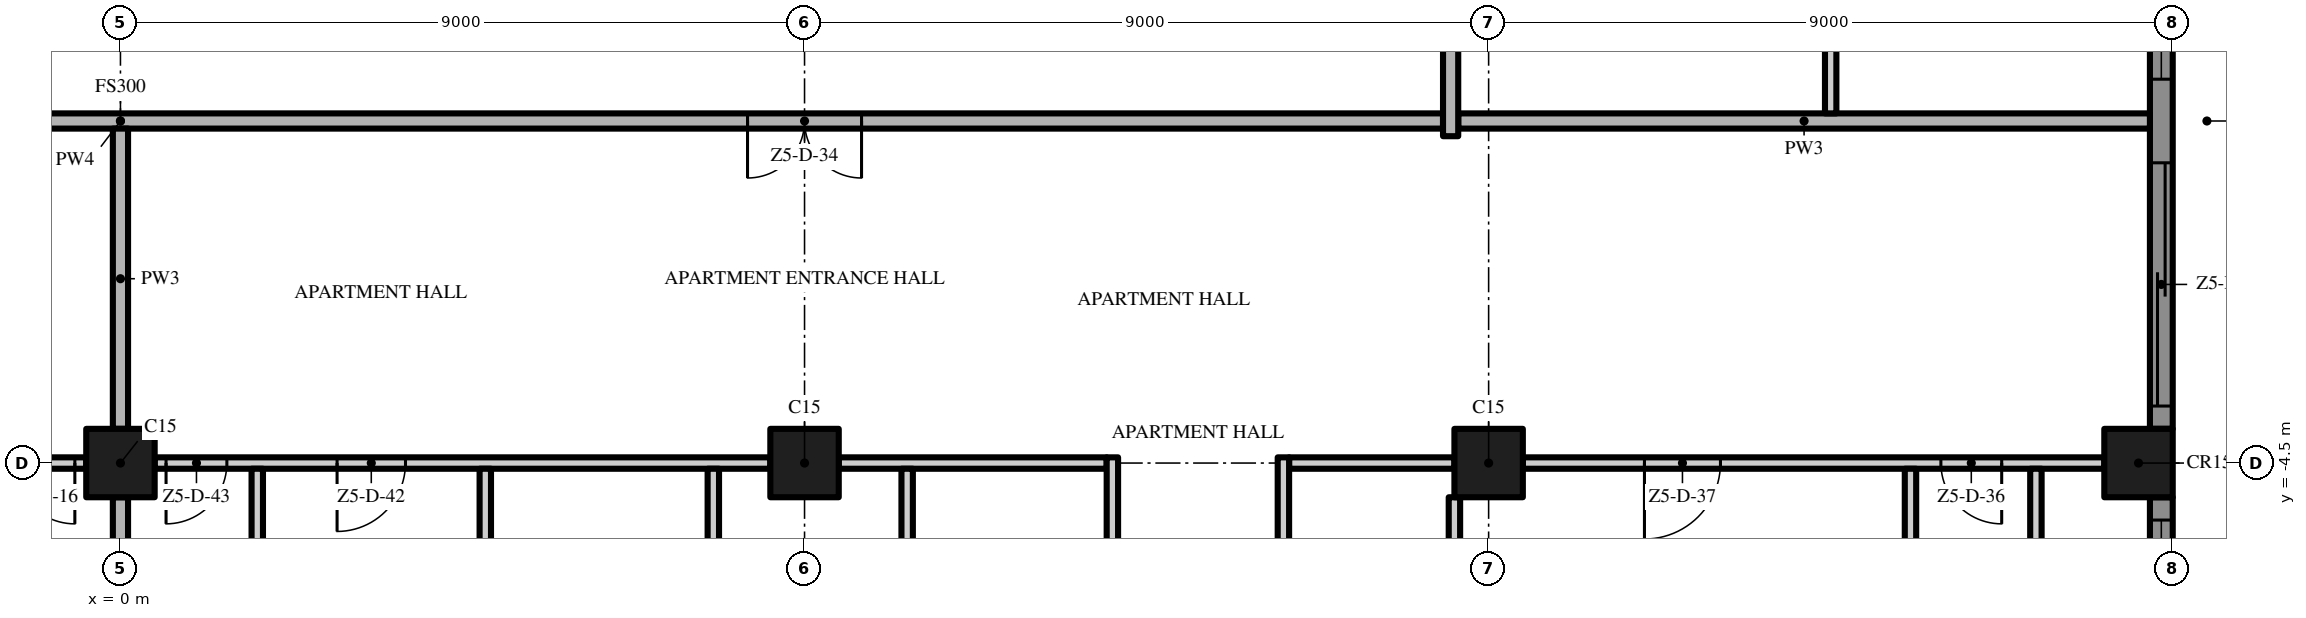
"""IFC4 building model, lengths in metres.
Left out: names, types, materials, properties, quantities, classifications, styles, units other than length and angle.
Written with IfcOpenShell. Run it as: python <this file> out.ifc"""

import sys

from ifc_helpers import new_model, si_unit, direction, frame, frame_2d, origin, origin_2d, place, context, subcontext, project, spatial, polyline, rectangle, outline, extrude, element, fill, save


model = new_model("IFC4")
c1 = context("Model", 3, precision=1e-05, world=origin(), true_north=direction((0.0, 1.0)))
c2 = subcontext(c1, "Body", "Model", "MODEL_VIEW")
j1 = project(units=[si_unit("LENGTHUNIT", "METRE"), si_unit("PLANEANGLEUNIT", "RADIAN")], contexts=[c1])
p1 = place(None, origin())
s1 = spatial("IfcSite", under=j1, at=p1, CompositionType="ELEMENT")
p2 = place(p1, origin())
s2 = spatial("IfcBuilding", under=s1, at=p2, CompositionType="ELEMENT")
p3 = place(p2, frame((0.0, 0.0, 280.6)))
s3 = spatial("IfcBuildingStorey", under=s2, at=p3, CompositionType="ELEMENT", Elevation=280.6)
for number, where, z_axis, x_axis in (
    (1, (0.0, -4.5, 0.0), (0.0, 0.0, 1.0), (1.0, 0.0, 0.0)),
    (2, (18.0, -4.5, 0.0), (0.0, 0.0, 1.0), (1.0, 0.0, 0.0)),
    (3, (26.55, -4.5, 0.0), (0.0, 0.0, 1.0), (1.0, 0.0, 0.0)),
    (4, (9.0, -4.5, 0.0), (0.0, 0.0, 1.0), (1.0, 0.0, 0.0)),
):
    element("IfcColumn", number, at=place(p3, frame(where, z_axis=z_axis, x_axis=x_axis)), inside=s3, PredefinedType="COLUMN", context=c2, shape_type="SweptSolid", body=[
        extrude(rectangle(XDim=0.9, YDim=0.9, at=origin_2d()), origin(), (0.0, 0.0, 1.0), 3.5),
    ])
p4 = place(p3, frame((26.85, -4.95, 0.0), z_axis=(0.0, 0.0, 1.0), x_axis=(0.0, -1.0, 0.0)))
e5 = element("IfcWall", 5, at=p4, inside=s3, PredefinedType="SOLIDWALL", context=c2, shape_type="SweptSolid", body=[
    extrude(rectangle(XDim=8.1, YDim=0.3, at=frame_2d((4.05, 0.0))), origin(), (0.0, 0.0, 1.0), 3.5),
])
p5 = place(p4, frame((4.6, 0.0, 0.45)))
e6 = element("IfcOpeningElement", 6, at=p5, cuts=e5, PredefinedType="OPENING", context=c2, shape_type="SweptSolid", body=[
    extrude(rectangle(XDim=3.2, YDim=2.65, at=frame_2d((1.6, 1.325))), frame((0.0, 0.16, 0.0), z_axis=(0.0, -1.0, 0.0), x_axis=(1.0, 0.0, 0.0)), (0.0, 0.0, 1.0), 0.32),
])
p6 = place(p4, frame((0.3, 0.0, 0.45)))
e7 = element("IfcOpeningElement", 7, at=p6, cuts=e5, PredefinedType="OPENING", context=c2, shape_type="SweptSolid", body=[
    extrude(rectangle(XDim=3.2, YDim=2.65, at=frame_2d((1.6, 1.325))), frame((0.0, 0.16, 0.0), z_axis=(0.0, -1.0, 0.0), x_axis=(1.0, 0.0, 0.0)), (0.0, 0.0, 1.0), 0.32),
])
p7 = place(p3, frame((26.85, 4.05, 0.0), z_axis=(0.0, 0.0, 1.0), x_axis=(0.0, -1.0, 0.0)))
e8 = element("IfcWall", 8, at=p7, inside=s3, PredefinedType="SOLIDWALL", context=c2, shape_type="SweptSolid", body=[
    extrude(rectangle(XDim=8.1, YDim=0.3, at=frame_2d((4.05, 0.0))), origin(), (0.0, 0.0, 1.0), 3.5),
])
p8 = place(p7, frame((4.6, 0.0, 0.0)))
e9 = element("IfcOpeningElement", 9, at=p8, cuts=e8, PredefinedType="OPENING", context=c2, shape_type="SweptSolid", body=[
    extrude(rectangle(XDim=3.2, YDim=2.4, at=frame_2d((1.6, 1.2))), frame((0.0, 0.16, 0.0), z_axis=(0.0, -1.0, 0.0), x_axis=(1.0, 0.0, 0.0)), (0.0, 0.0, 1.0), 0.32),
])
p9 = place(p7, frame((0.3, 0.0, 0.45)))
e10 = element("IfcOpeningElement", 10, at=p9, cuts=e8, PredefinedType="OPENING", context=c2, shape_type="SweptSolid", body=[
    extrude(rectangle(XDim=3.2, YDim=2.65, at=frame_2d((1.6, 1.325))), frame((0.0, 0.16, 0.0), z_axis=(0.0, -1.0, 0.0), x_axis=(1.0, 0.0, 0.0)), (0.0, 0.0, 1.0), 0.32),
])
p10 = place(p3, origin())
e11 = element("IfcWall", 11, at=p10, inside=s3, PredefinedType="USERDEFINED", context=c2, shape_type="SweptSolid", body=[
    extrude(outline(polyline([(30.0, -18.0), (29.771, -16.5), (29.171, -15.0), (28.429, -13.5), (27.829, -12.0), (27.6, -10.5), (27.829, -9.0), (28.429, -7.5), (29.171, -6.0), (29.771, -4.5), (30.0, -3.0), (29.771, -1.5), (29.171, 0.0), (28.429, 1.5), (27.829, 3.0), (27.6, 4.5), (27.829, 6.0), (28.429, 7.5), (29.171, 9.0), (29.771, 10.5), (30.0, 12.0), (29.771, 13.5), (29.171, 15.0), (28.429, 16.5), (27.829, 18.0), (27.597, 17.907), (28.201, 16.398), (28.942, 14.898), (29.528, 13.434), (29.747, 12.0), (29.528, 10.566), (28.942, 9.102), (28.201, 7.602), (27.586, 6.066), (27.347, 4.5), (27.586, 2.934), (28.201, 1.398), (28.942, -0.102), (29.528, -1.566), (29.747, -3.0), (29.528, -4.434), (28.942, -5.898), (28.201, -7.398), (27.586, -8.934), (27.347, -10.5), (27.586, -12.066), (28.201, -13.602), (28.942, -15.102), (29.528, -16.566), (29.753, -18.038), (30.0, -18.0)])), origin(), (0.0, 0.0, 1.0), 0.9),
])
p11 = place(p3, frame((-0.45, -4.5, 0.0), z_axis=(0.0, 0.0, 1.0), x_axis=(-1.0, 0.0, 0.0)))
e12 = element("IfcWall", 12, at=p11, inside=s3, PredefinedType="PARTITIONING", context=c2, shape_type="SweptSolid", body=[
    extrude(rectangle(XDim=8.1, YDim=0.15, at=frame_2d((4.05, 0.0))), origin(), (0.0, 0.0, 1.0), 3.5),
])
p12 = place(p11, frame((0.15, 0.0, 0.0)))
e13 = element("IfcOpeningElement", 13, at=p12, cuts=e12, PredefinedType="OPENING", context=c2, shape_type="SweptSolid", body=[
    extrude(rectangle(XDim=0.8, YDim=2.0, at=frame_2d((0.4, 1.0))), frame((0.0, 0.085, 0.0), z_axis=(0.0, -1.0, 0.0), x_axis=(1.0, 0.0, 0.0)), (0.0, 0.0, 1.0), 0.17),
])
p13 = place(p11, frame((1.85, 0.0, 0.0)))
e14 = element("IfcOpeningElement", 14, at=p13, cuts=e12, PredefinedType="OPENING", context=c2, shape_type="SweptSolid", body=[
    extrude(rectangle(XDim=0.8, YDim=2.0, at=frame_2d((0.4, 1.0))), frame((0.0, 0.085, 0.0), z_axis=(0.0, -1.0, 0.0), x_axis=(1.0, 0.0, 0.0)), (0.0, 0.0, 1.0), 0.17),
])
p14 = place(p11, frame((3.6, 0.0, 0.0)))
e15 = element("IfcOpeningElement", 15, at=p14, cuts=e12, PredefinedType="OPENING", context=c2, shape_type="SweptSolid", body=[
    extrude(rectangle(XDim=0.8, YDim=2.0, at=frame_2d((0.4, 1.0))), frame((0.0, 0.085, 0.0), z_axis=(0.0, -1.0, 0.0), x_axis=(1.0, 0.0, 0.0)), (0.0, 0.0, 1.0), 0.17),
])
p15 = place(p3, frame((8.55, -4.5, 0.0), z_axis=(0.0, 0.0, 1.0), x_axis=(-1.0, 0.0, 0.0)))
e16 = element("IfcWall", 16, at=p15, inside=s3, PredefinedType="PARTITIONING", context=c2, shape_type="SweptSolid", body=[
    extrude(rectangle(XDim=8.1, YDim=0.15, at=frame_2d((4.05, 0.0))), origin(), (0.0, 0.0, 1.0), 3.5),
])
p16 = place(p15, frame((4.8, 0.0, 0.0)))
e17 = element("IfcOpeningElement", 17, at=p16, cuts=e16, PredefinedType="OPENING", context=c2, shape_type="SweptSolid", body=[
    extrude(rectangle(XDim=0.9, YDim=2.1, at=frame_2d((0.45, 1.05))), frame((0.0, 0.085, 0.0), z_axis=(0.0, -1.0, 0.0), x_axis=(1.0, 0.0, 0.0)), (0.0, 0.0, 1.0), 0.17),
])
p17 = place(p15, frame((7.15, 0.0, 0.0)))
e18 = element("IfcOpeningElement", 18, at=p17, cuts=e16, PredefinedType="OPENING", context=c2, shape_type="SweptSolid", body=[
    extrude(rectangle(XDim=0.8, YDim=2.0, at=frame_2d((0.4, 1.0))), frame((0.0, 0.085, 0.0), z_axis=(0.0, -1.0, 0.0), x_axis=(1.0, 0.0, 0.0)), (0.0, 0.0, 1.0), 0.17),
])
p18 = place(p3, frame((9.45, -4.5, 0.0), z_axis=(0.0, 0.0, 1.0), x_axis=(1.0, 0.0, 0.0)))
e19 = element("IfcWall", 19, at=p18, inside=s3, PredefinedType="PARTITIONING", context=c2, shape_type="SweptSolid", body=[
    extrude(rectangle(XDim=3.525, YDim=0.15, at=frame_2d((1.762, 0.0))), origin(), (0.0, 0.0, 1.0), 3.5),
])
p19 = place(p3, frame((15.375, -4.5, 0.0), z_axis=(0.0, 0.0, 1.0), x_axis=(1.0, 0.0, 0.0)))
e20 = element("IfcWall", 20, at=p19, inside=s3, PredefinedType="PARTITIONING", context=c2, shape_type="SweptSolid", body=[
    extrude(rectangle(XDim=2.175, YDim=0.15, at=frame_2d((1.087, 0.0))), origin(), (0.0, 0.0, 1.0), 3.5),
])
p20 = place(p3, frame((26.1, -4.5, 0.0), z_axis=(0.0, 0.0, 1.0), x_axis=(-1.0, 0.0, 0.0)))
e21 = element("IfcWall", 21, at=p20, inside=s3, PredefinedType="PARTITIONING", context=c2, shape_type="SweptSolid", body=[
    extrude(rectangle(XDim=7.65, YDim=0.15, at=frame_2d((3.825, 0.0))), origin(), (0.0, 0.0, 1.0), 3.5),
])
p21 = place(p20, frame((1.35, 0.0, 0.0)))
e22 = element("IfcOpeningElement", 22, at=p21, cuts=e21, PredefinedType="OPENING", context=c2, shape_type="SweptSolid", body=[
    extrude(rectangle(XDim=0.8, YDim=2.0, at=frame_2d((0.4, 1.0))), frame((0.0, 0.085, 0.0), z_axis=(0.0, -1.0, 0.0), x_axis=(1.0, 0.0, 0.0)), (0.0, 0.0, 1.0), 0.17),
])
p22 = place(p20, frame((5.05, 0.0, 0.0)))
e23 = element("IfcOpeningElement", 23, at=p22, cuts=e21, PredefinedType="OPENING", context=c2, shape_type="SweptSolid", body=[
    extrude(rectangle(XDim=1.0, YDim=2.4, at=frame_2d((0.5, 1.2))), frame((0.0, 0.085, 0.0), z_axis=(0.0, -1.0, 0.0), x_axis=(1.0, 0.0, 0.0)), (0.0, 0.0, 1.0), 0.17),
])
p23 = place(p3, frame((17.4, 0.0, 0.0), z_axis=(0.0, 0.0, 1.0), x_axis=(-1.0, 0.0, 0.0)))
e24 = element("IfcWall", 24, at=p23, inside=s3, PredefinedType="PARTITIONING", context=c2, shape_type="SweptSolid", body=[
    extrude(rectangle(XDim=34.8, YDim=0.2, at=frame_2d((17.4, 0.0))), origin(), (0.0, 0.0, 1.0), 3.5),
])
p24 = place(p23, frame((25.65, 0.0, 0.0)))
e25 = element("IfcOpeningElement", 25, at=p24, cuts=e24, PredefinedType="OPENING", context=c2, shape_type="SweptSolid", body=[
    extrude(rectangle(XDim=1.5, YDim=2.4, at=frame_2d((0.75, 1.2))), frame((0.0, 0.11, 0.0), z_axis=(0.0, -1.0, 0.0), x_axis=(1.0, 0.0, 0.0)), (0.0, 0.0, 1.0), 0.22),
])
p25 = place(p23, frame((7.65, 0.0, 0.0)))
e26 = element("IfcOpeningElement", 26, at=p25, cuts=e24, PredefinedType="OPENING", context=c2, shape_type="SweptSolid", body=[
    extrude(rectangle(XDim=1.5, YDim=2.4, at=frame_2d((0.75, 1.2))), frame((0.0, 0.11, 0.0), z_axis=(0.0, -1.0, 0.0), x_axis=(1.0, 0.0, 0.0)), (0.0, 0.0, 1.0), 0.22),
])
p26 = place(p3, frame((17.6, 0.0, 0.0), z_axis=(0.0, 0.0, 1.0), x_axis=(1.0, 0.0, 0.0)))
e27 = element("IfcWall", 27, at=p26, inside=s3, PredefinedType="PARTITIONING", context=c2, shape_type="SweptSolid", body=[
    extrude(rectangle(XDim=9.1, YDim=0.2, at=frame_2d((4.55, 0.0))), origin(), (0.0, 0.0, 1.0), 3.5),
])
p27 = place(p3, frame((0.0, -13.05, 0.0), z_axis=(0.0, 0.0, 1.0), x_axis=(0.0, 1.0, 0.0)))
e28 = element("IfcWall", 28, at=p27, inside=s3, PredefinedType="PARTITIONING", context=c2, shape_type="SweptSolid", body=[
    extrude(rectangle(XDim=8.1, YDim=0.2, at=frame_2d((4.05, 0.0))), origin(), (0.0, 0.0, 1.0), 3.5),
])
p28 = place(p3, frame((0.0, -4.05, 0.0), z_axis=(0.0, 0.0, 1.0), x_axis=(0.0, 1.0, 0.0)))
e29 = element("IfcWall", 29, at=p28, inside=s3, PredefinedType="PARTITIONING", context=c2, shape_type="SweptSolid", body=[
    extrude(rectangle(XDim=3.95, YDim=0.2, at=frame_2d((1.975, 0.0))), origin(), (0.0, 0.0, 1.0), 3.5),
])
for number, where, z_axis, x_axis in (
    (30, (1.8, -8.925, 0.0), (0.0, 0.0, 1.0), (0.0, 1.0, 0.0)),
    (31, (4.8, -8.925, 0.0), (0.0, 0.0, 1.0), (0.0, 1.0, 0.0)),
    (32, (7.8, -8.925, 0.0), (0.0, 0.0, 1.0), (0.0, 1.0, 0.0)),
    (33, (10.35, -8.925, 0.0), (0.0, 0.0, 1.0), (0.0, 1.0, 0.0)),
):
    element("IfcWall", number, at=place(p3, frame(where, z_axis=z_axis, x_axis=x_axis)), inside=s3, PredefinedType="PARTITIONING", context=c2, shape_type="SweptSolid", body=[
        extrude(rectangle(XDim=4.35, YDim=0.15, at=frame_2d((2.175, 0.0))), origin(), (0.0, 0.0, 1.0), 3.5),
    ])
p29 = place(p3, frame((13.05, -8.925, 0.0), z_axis=(0.0, 0.0, 1.0), x_axis=(0.0, 1.0, 0.0)))
e34 = element("IfcWall", 34, at=p29, inside=s3, PredefinedType="PARTITIONING", context=c2, shape_type="SweptSolid", body=[
    extrude(rectangle(XDim=4.5, YDim=0.15, at=frame_2d((2.25, 0.0))), origin(), (0.0, 0.0, 1.0), 3.5),
])
p30 = place(p3, frame((15.3, -4.425, 0.0), z_axis=(0.0, 0.0, 1.0), x_axis=(0.0, -1.0, 0.0)))
e35 = element("IfcWall", 35, at=p30, inside=s3, PredefinedType="PARTITIONING", context=c2, shape_type="SweptSolid", body=[
    extrude(rectangle(XDim=4.65, YDim=0.15, at=frame_2d((2.325, 0.0))), origin(), (0.0, 0.0, 1.0), 3.5),
])
p31 = place(p30, frame((1.875, 0.0, 0.0)))
e36 = element("IfcOpeningElement", 36, at=p31, cuts=e35, PredefinedType="OPENING", context=c2, shape_type="SweptSolid", body=[
    extrude(rectangle(XDim=0.9, YDim=2.1, at=frame_2d((0.45, 1.05))), frame((0.0, 0.085, 0.0), z_axis=(0.0, -1.0, 0.0), x_axis=(1.0, 0.0, 0.0)), (0.0, 0.0, 1.0), 0.17),
])
p32 = place(p3, frame((17.5, -0.2, 0.0), z_axis=(0.0, 0.0, 1.0), x_axis=(0.0, 1.0, 0.0)))
e37 = element("IfcWall", 37, at=p32, inside=s3, PredefinedType="PARTITIONING", context=c2, shape_type="SweptSolid", body=[
    extrude(rectangle(XDim=4.25, YDim=0.2, at=frame_2d((2.125, 0.0))), origin(), (0.0, 0.0, 1.0), 3.5),
])
p33 = place(p3, frame((17.55, -8.925, 0.0), z_axis=(0.0, 0.0, 1.0), x_axis=(0.0, 1.0, 0.0)))
e38 = element("IfcWall", 38, at=p33, inside=s3, PredefinedType="PARTITIONING", context=c2, shape_type="SweptSolid", body=[
    extrude(rectangle(XDim=3.975, YDim=0.15, at=frame_2d((1.988, 0.0))), origin(), (0.0, 0.0, 1.0), 3.5),
])
p34 = place(p3, frame((22.5, 17.55, 0.0), z_axis=(0.0, 0.0, 1.0), x_axis=(0.0, -1.0, 0.0)))
e39 = element("IfcWall", 39, at=p34, inside=s3, PredefinedType="PARTITIONING", context=c2, shape_type="SweptSolid", body=[
    extrude(rectangle(XDim=17.45, YDim=0.15, at=frame_2d((8.725, 0.0))), origin(), (0.0, 0.0, 1.0), 3.5),
])
p35 = place(p34, frame((14.8, 0.0, 0.0)))
e40 = element("IfcOpeningElement", 40, at=p35, cuts=e39, PredefinedType="OPENING", context=c2, shape_type="SweptSolid", body=[
    extrude(rectangle(XDim=1.0, YDim=2.4, at=frame_2d((0.5, 1.2))), frame((0.0, 0.085, 0.0), z_axis=(0.0, -1.0, 0.0), x_axis=(1.0, 0.0, 0.0)), (0.0, 0.0, 1.0), 0.17),
])
p36 = place(p34, frame((7.65, 0.0, 0.0)))
e41 = element("IfcOpeningElement", 41, at=p36, cuts=e39, PredefinedType="OPENING", context=c2, shape_type="SweptSolid", body=[
    extrude(rectangle(XDim=1.8, YDim=2.4, at=frame_2d((0.9, 1.2))), frame((0.0, 0.085, 0.0), z_axis=(0.0, -1.0, 0.0), x_axis=(1.0, 0.0, 0.0)), (0.0, 0.0, 1.0), 0.17),
])
for number, where, z_axis, x_axis in (
    (42, (23.55, -8.925, 0.0), (0.0, 0.0, 1.0), (0.0, 1.0, 0.0)),
    (43, (25.2, -8.925, 0.0), (0.0, 0.0, 1.0), (0.0, 1.0, 0.0)),
):
    element("IfcWall", number, at=place(p3, frame(where, z_axis=z_axis, x_axis=x_axis)), inside=s3, PredefinedType="PARTITIONING", context=c2, shape_type="SweptSolid", body=[
        extrude(rectangle(XDim=4.35, YDim=0.15, at=frame_2d((2.175, 0.0))), origin(), (0.0, 0.0, 1.0), 3.5),
    ])
p37 = place(p6, origin())
e44 = element("IfcWindow", 44, at=p37, inside=s3, PartitioningType="SINGLE_PANEL", PredefinedType="WINDOW", context=c2, shape_type="SweptSolid", body=[
    extrude(rectangle(XDim=3.2, YDim=2.65, at=frame_2d((1.6, 1.325))), frame((0.0, 0.03, 0.0), z_axis=(0.0, -1.0, 0.0), x_axis=(1.0, 0.0, 0.0)), (0.0, 0.0, 1.0), 0.06),
])
fill(e7, e44)
p38 = place(p8, origin())
e45 = element("IfcDoor", 45, at=p38, inside=s3, OperationType="SINGLE_SWING_LEFT", PredefinedType="DOOR", context=c2, shape_type="SweptSolid", body=[
    extrude(rectangle(XDim=3.2, YDim=2.4, at=frame_2d((1.6, 1.2))), frame((0.0, 0.025, 0.0), z_axis=(0.0, -1.0, 0.0), x_axis=(1.0, 0.0, 0.0)), (0.0, 0.0, 1.0), 0.05),
])
fill(e9, e45)
p39 = place(p9, origin())
e46 = element("IfcWindow", 46, at=p39, inside=s3, PartitioningType="SINGLE_PANEL", PredefinedType="WINDOW", context=c2, shape_type="SweptSolid", body=[
    extrude(rectangle(XDim=3.2, YDim=2.65, at=frame_2d((1.6, 1.325))), frame((0.0, 0.03, 0.0), z_axis=(0.0, -1.0, 0.0), x_axis=(1.0, 0.0, 0.0)), (0.0, 0.0, 1.0), 0.06),
])
fill(e10, e46)
p40 = place(p12, origin())
e47 = element("IfcDoor", 47, at=p40, inside=s3, OperationType="SINGLE_SWING_LEFT", PredefinedType="DOOR", context=c2, shape_type="SweptSolid", body=[
    extrude(rectangle(XDim=0.8, YDim=2.0, at=frame_2d((0.4, 1.0))), frame((0.0, 0.025, 0.0), z_axis=(0.0, -1.0, 0.0), x_axis=(1.0, 0.0, 0.0)), (0.0, 0.0, 1.0), 0.05),
])
fill(e13, e47)
p41 = place(p25, origin())
e48 = element("IfcDoor", 48, at=p41, inside=s3, OperationType="DOUBLE_DOOR_SINGLE_SWING", PredefinedType="DOOR", context=c2, shape_type="SweptSolid", body=[
    extrude(rectangle(XDim=1.5, YDim=2.4, at=frame_2d((0.75, 1.2))), frame((0.0, 0.025, 0.0), z_axis=(0.0, -1.0, 0.0), x_axis=(1.0, 0.0, 0.0)), (0.0, 0.0, 1.0), 0.05),
])
fill(e26, e48)
p42 = place(p21, origin())
e49 = element("IfcDoor", 49, at=p42, inside=s3, OperationType="SINGLE_SWING_LEFT", PredefinedType="DOOR", context=c2, shape_type="SweptSolid", body=[
    extrude(rectangle(XDim=0.8, YDim=2.0, at=frame_2d((0.4, 1.0))), frame((0.0, 0.025, 0.0), z_axis=(0.0, -1.0, 0.0), x_axis=(1.0, 0.0, 0.0)), (0.0, 0.0, 1.0), 0.05),
])
fill(e22, e49)
p43 = place(p22, origin())
e50 = element("IfcDoor", 50, at=p43, inside=s3, OperationType="SINGLE_SWING_RIGHT", PredefinedType="DOOR", context=c2, shape_type="SweptSolid", body=[
    extrude(rectangle(XDim=1.0, YDim=2.4, at=frame_2d((0.5, 1.2))), frame((0.0, 0.025, 0.0), z_axis=(0.0, -1.0, 0.0), x_axis=(1.0, 0.0, 0.0)), (0.0, 0.0, 1.0), 0.05),
])
fill(e23, e50)
p44 = place(p16, origin())
e51 = element("IfcDoor", 51, at=p44, inside=s3, OperationType="SINGLE_SWING_RIGHT", PredefinedType="DOOR", context=c2, shape_type="SweptSolid", body=[
    extrude(rectangle(XDim=0.9, YDim=2.1, at=frame_2d((0.45, 1.05))), frame((0.0, 0.025, 0.0), z_axis=(0.0, -1.0, 0.0), x_axis=(1.0, 0.0, 0.0)), (0.0, 0.0, 1.0), 0.05),
])
fill(e17, e51)
p45 = place(p17, origin())
e52 = element("IfcDoor", 52, at=p45, inside=s3, OperationType="SINGLE_SWING_RIGHT", PredefinedType="DOOR", context=c2, shape_type="SweptSolid", body=[
    extrude(rectangle(XDim=0.8, YDim=2.0, at=frame_2d((0.4, 1.0))), frame((0.0, 0.025, 0.0), z_axis=(0.0, -1.0, 0.0), x_axis=(1.0, 0.0, 0.0)), (0.0, 0.0, 1.0), 0.05),
])
fill(e18, e52)
save(model, sys.argv[1])
